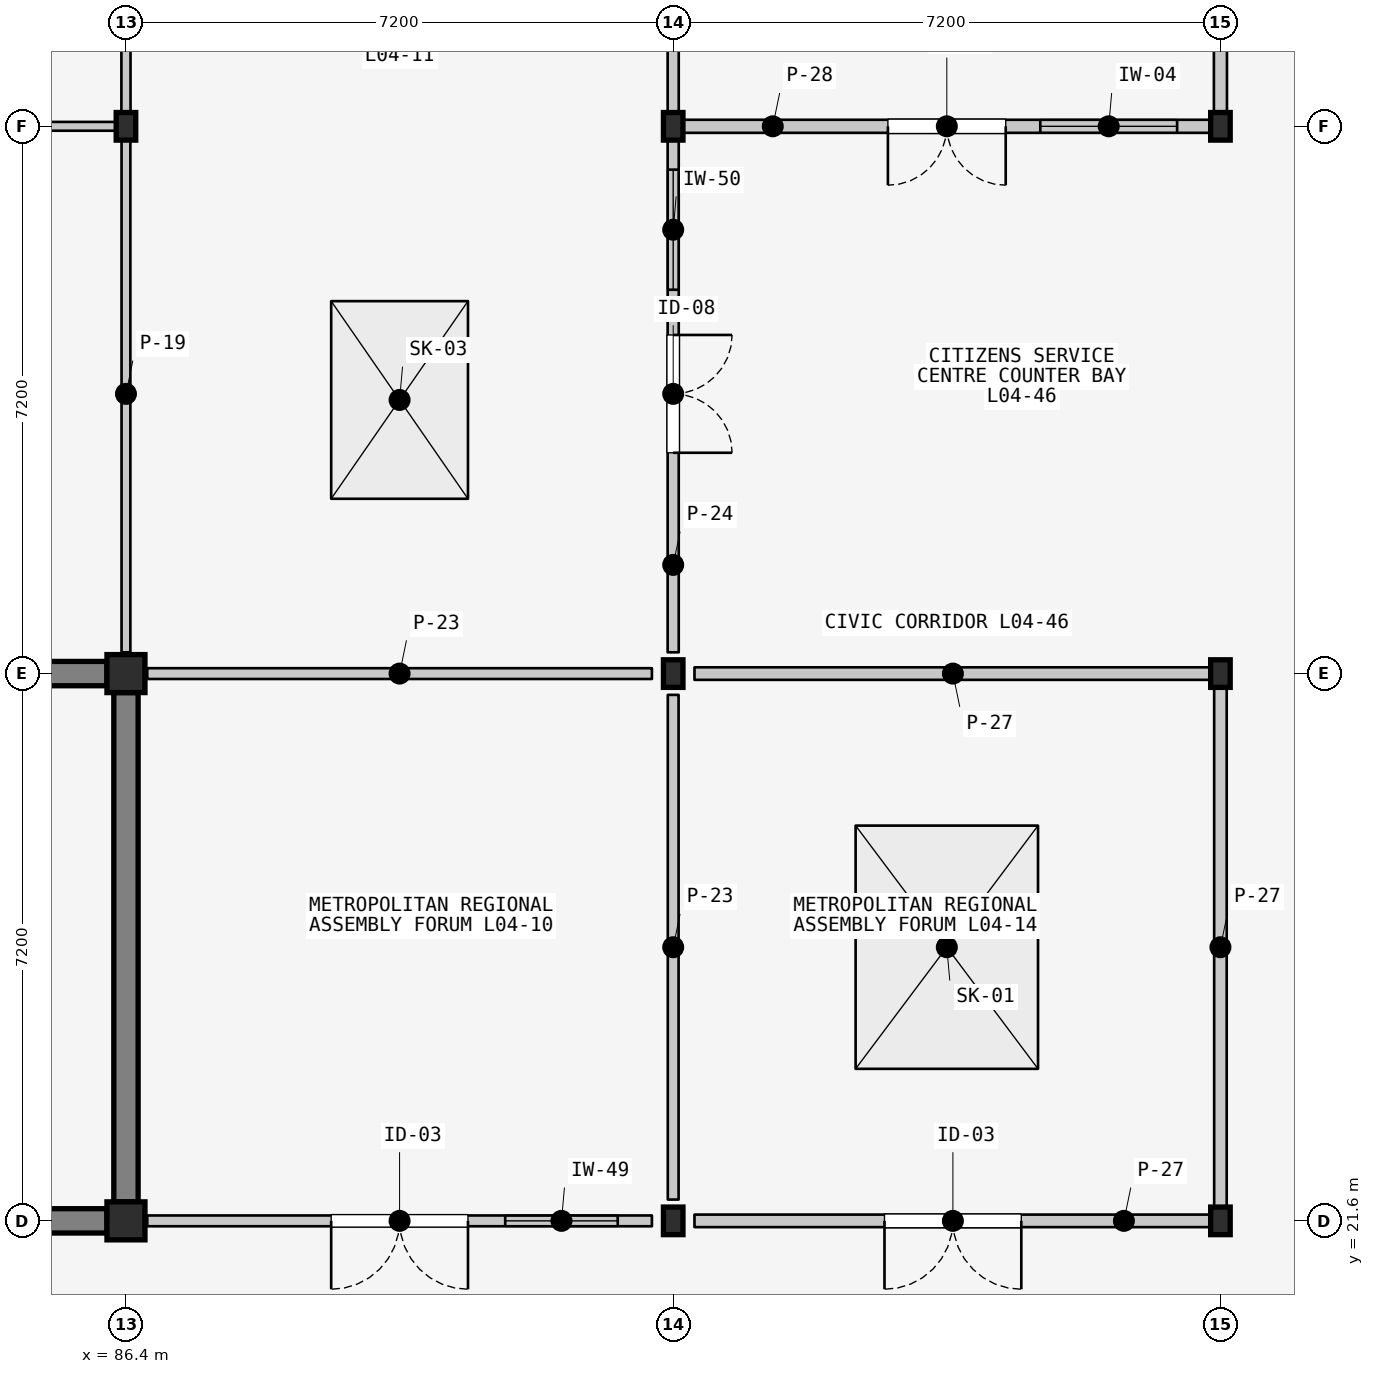
"""IFC4 building model, lengths in metres.
Left out: names, types, materials, properties, quantities, classifications, styles, units other than length and angle.
Written with IfcOpenShell. Run it as: python <this file> out.ifc"""

import sys

from ifc_helpers import new_model, si_unit, direction, frame, frame_2d, origin, origin_2d, place, context, subcontext, project, spatial, rectangle, i_section, extrude, element, fill, save


model = new_model("IFC4")
c1 = context("Model", 3, precision=1e-05, world=origin(), true_north=direction((0.0, 1.0)))
c2 = subcontext(c1, "Body", "Model", "MODEL_VIEW")
j1 = project(units=[si_unit("LENGTHUNIT", "METRE"), si_unit("PLANEANGLEUNIT", "RADIAN")], contexts=[c1])
p1 = place(None, origin())
s1 = spatial("IfcSite", under=j1, at=p1, CompositionType="ELEMENT")
p2 = place(p1, origin())
s2 = spatial("IfcBuilding", under=s1, at=p2, CompositionType="ELEMENT")
p3 = place(p2, frame((0.0, 0.0, 14.1)))
s3 = spatial("IfcBuildingStorey", under=s2, at=p3, CompositionType="ELEMENT", Elevation=14.1)
p4 = place(p3, frame((86.4, 21.6, 0.0), z_axis=(0.0, 0.0, 1.0), x_axis=(1.0, 0.0, 0.0)))
e1 = element("IfcColumn", 1, at=p4, inside=s3, PredefinedType="COLUMN", context=c2, shape_type="SweptSolid", body=[
    extrude(rectangle(XDim=0.5, YDim=0.5, at=origin_2d()), origin(), (0.0, 0.0, 1.0), 7.647),
])
p5 = place(p3, frame((86.4, 28.8, 0.0), z_axis=(0.0, 0.0, 1.0), x_axis=(1.0, 0.0, 0.0)))
e2 = element("IfcColumn", 2, at=p5, inside=s3, PredefinedType="COLUMN", context=c2, shape_type="SweptSolid", body=[
    extrude(rectangle(XDim=0.5, YDim=0.5, at=origin_2d()), origin(), (0.0, 0.0, 1.0), 8.99),
])
p6 = place(p3, frame((86.4, 36.0, 0.0), z_axis=(0.0, 0.0, 1.0), x_axis=(1.0, 0.0, 0.0)))
e3 = element("IfcColumn", 3, at=p6, inside=s3, PredefinedType="COLUMN", context=c2, shape_type="SweptSolid", body=[
    extrude(i_section(OverallWidth=0.257, OverallDepth=0.363, WebThickness=0.013, FlangeThickness=0.022, FilletRadius=0.015, at=origin_2d()), origin(), (0.0, 0.0, 1.0), 10.333),
])
p7 = place(p3, frame((93.6, 21.6, 0.0), z_axis=(0.0, 0.0, 1.0), x_axis=(1.0, 0.0, 0.0)))
e4 = element("IfcColumn", 4, at=p7, inside=s3, PredefinedType="COLUMN", context=c2, shape_type="SweptSolid", body=[
    extrude(i_section(OverallWidth=0.257, OverallDepth=0.363, WebThickness=0.013, FlangeThickness=0.022, FilletRadius=0.015, at=origin_2d()), origin(), (0.0, 0.0, 1.0), 7.676),
])
p8 = place(p3, frame((93.6, 28.8, 0.0), z_axis=(0.0, 0.0, 1.0), x_axis=(1.0, 0.0, 0.0)))
e5 = element("IfcColumn", 5, at=p8, inside=s3, PredefinedType="COLUMN", context=c2, shape_type="SweptSolid", body=[
    extrude(i_section(OverallWidth=0.257, OverallDepth=0.363, WebThickness=0.013, FlangeThickness=0.022, FilletRadius=0.015, at=origin_2d()), origin(), (0.0, 0.0, 1.0), 9.019),
])
p9 = place(p3, frame((93.6, 36.0, 0.0), z_axis=(0.0, 0.0, 1.0), x_axis=(1.0, 0.0, 0.0)))
e6 = element("IfcColumn", 6, at=p9, inside=s3, PredefinedType="COLUMN", context=c2, shape_type="SweptSolid", body=[
    extrude(i_section(OverallWidth=0.257, OverallDepth=0.363, WebThickness=0.013, FlangeThickness=0.022, FilletRadius=0.015, at=origin_2d()), origin(), (0.0, 0.0, 1.0), 10.362),
])
p10 = place(p3, frame((100.8, 21.6, 0.0), z_axis=(0.0, 0.0, 1.0), x_axis=(1.0, 0.0, 0.0)))
e7 = element("IfcColumn", 7, at=p10, inside=s3, PredefinedType="COLUMN", context=c2, shape_type="SweptSolid", body=[
    extrude(i_section(OverallWidth=0.257, OverallDepth=0.363, WebThickness=0.013, FlangeThickness=0.022, FilletRadius=0.015, at=origin_2d()), origin(), (0.0, 0.0, 1.0), 7.705),
])
p11 = place(p3, frame((100.8, 28.8, 0.0), z_axis=(0.0, 0.0, 1.0), x_axis=(1.0, 0.0, 0.0)))
e8 = element("IfcColumn", 8, at=p11, inside=s3, PredefinedType="COLUMN", context=c2, shape_type="SweptSolid", body=[
    extrude(i_section(OverallWidth=0.257, OverallDepth=0.363, WebThickness=0.013, FlangeThickness=0.022, FilletRadius=0.015, at=origin_2d()), origin(), (0.0, 0.0, 1.0), 9.048),
])
p12 = place(p3, frame((100.8, 36.0, 0.0), z_axis=(0.0, 0.0, 1.0), x_axis=(1.0, 0.0, 0.0)))
e9 = element("IfcColumn", 9, at=p12, inside=s3, PredefinedType="COLUMN", context=c2, shape_type="SweptSolid", body=[
    extrude(i_section(OverallWidth=0.257, OverallDepth=0.363, WebThickness=0.013, FlangeThickness=0.022, FilletRadius=0.015, at=origin_2d()), origin(), (0.0, 0.0, 1.0), 10.39),
])
p13 = place(p3, frame((79.45, 21.6, 0.0), z_axis=(0.0, 0.0, 1.0), x_axis=(1.0, 0.0, 0.0)))
e10 = element("IfcWall", 10, at=p13, inside=s3, PredefinedType="SOLIDWALL", context=c2, shape_type="SweptSolid", body=[
    extrude(rectangle(XDim=6.7, YDim=0.32, at=frame_2d((3.35, 0.0))), origin(), (0.0, 0.0, 1.0), 6.892),
])
p14 = place(p3, frame((86.15, 28.8, 0.0), z_axis=(0.0, 0.0, 1.0), x_axis=(-1.0, 0.0, 0.0)))
e11 = element("IfcWall", 11, at=p14, inside=s3, PredefinedType="SOLIDWALL", context=c2, shape_type="SweptSolid", body=[
    extrude(rectangle(XDim=6.7, YDim=0.32, at=frame_2d((3.35, 0.0))), origin(), (0.0, 0.0, 1.0), 8.235),
])
p15 = place(p3, frame((86.4, 21.85, 0.0), z_axis=(0.0, 0.0, 1.0), x_axis=(0.0, 1.0, 0.0)))
e12 = element("IfcWall", 12, at=p15, inside=s3, PredefinedType="SOLIDWALL", context=c2, shape_type="SweptSolid", body=[
    extrude(rectangle(XDim=6.7, YDim=0.32, at=frame_2d((3.35, 0.0))), origin(), (0.0, 0.0, 1.0), 6.965),
])
p16 = place(p3, frame((79.32, 36.0, 0.0), z_axis=(0.0, 0.0, 1.0), x_axis=(1.0, 0.0, 0.0)))
e13 = element("IfcWall", 13, at=p16, inside=s3, PredefinedType="PARTITIONING", context=c2, shape_type="SweptSolid", body=[
    extrude(rectangle(XDim=6.96, YDim=0.116, at=frame_2d((3.48, 0.0))), origin(), (0.0, 0.0, 1.0), 3.72),
])
p17 = place(p3, frame((86.4, 35.88, 0.0), z_axis=(0.0, 0.0, 1.0), x_axis=(0.0, -1.0, 0.0)))
e14 = element("IfcWall", 14, at=p17, inside=s3, PredefinedType="PARTITIONING", context=c2, shape_type="SweptSolid", body=[
    extrude(rectangle(XDim=6.8, YDim=0.116, at=frame_2d((3.4, 0.0))), origin(), (0.0, 0.0, 1.0), 3.72),
])
p18 = place(p3, frame((86.4, 42.92, 0.0), z_axis=(0.0, 0.0, 1.0), x_axis=(0.0, -1.0, 0.0)))
e15 = element("IfcWall", 15, at=p18, inside=s3, PredefinedType="PARTITIONING", context=c2, shape_type="SweptSolid", body=[
    extrude(rectangle(XDim=6.8, YDim=0.12, at=frame_2d((3.4, 0.0))), origin(), (0.0, 0.0, 1.0), 3.72),
])
p19 = place(p3, frame((93.32, 21.6, 0.0), z_axis=(0.0, 0.0, 1.0), x_axis=(-1.0, 0.0, 0.0)))
e16 = element("IfcWall", 16, at=p19, inside=s3, PredefinedType="PARTITIONING", context=c2, shape_type="SweptSolid", body=[
    extrude(rectangle(XDim=6.64, YDim=0.142, at=frame_2d((3.32, 0.0))), origin(), (0.0, 0.0, 1.0), 3.72),
])
p20 = place(p19, frame((2.42, 0.0, 0.0)))
e17 = element("IfcOpeningElement", 17, at=p20, cuts=e16, PredefinedType="OPENING", context=c2, shape_type="SweptSolid", body=[
    extrude(rectangle(XDim=1.8, YDim=2.4, at=frame_2d((0.9, 1.2))), frame((0.0, 0.081, 0.0), z_axis=(0.0, -1.0, 0.0), x_axis=(1.0, 0.0, 0.0)), (0.0, 0.0, 1.0), 0.162),
])
p21 = place(p19, frame((0.45, 0.0, 1.05)))
e18 = element("IfcOpeningElement", 18, at=p21, cuts=e16, PredefinedType="OPENING", context=c2, shape_type="SweptSolid", body=[
    extrude(rectangle(XDim=1.48, YDim=1.48, at=frame_2d((0.74, 0.74))), frame((0.0, 0.081, 0.0), z_axis=(0.0, -1.0, 0.0), x_axis=(1.0, 0.0, 0.0)), (0.0, 0.0, 1.0), 0.162),
])
for number, where, z_axis, x_axis in (
    (19, (86.68, 28.8, 0.0), (0.0, 0.0, 1.0), (1.0, 0.0, 0.0)),
    (20, (93.6, 28.52, 0.0), (0.0, 0.0, 1.0), (0.0, -1.0, 0.0)),
):
    element("IfcWall", number, at=place(p3, frame(where, z_axis=z_axis, x_axis=x_axis)), inside=s3, PredefinedType="PARTITIONING", context=c2, shape_type="SweptSolid", body=[
        extrude(rectangle(XDim=6.64, YDim=0.142, at=frame_2d((3.32, 0.0))), origin(), (0.0, 0.0, 1.0), 3.72),
    ])
p22 = place(p3, frame((93.6, 35.88, 0.0), z_axis=(0.0, 0.0, 1.0), x_axis=(0.0, -1.0, 0.0)))
e21 = element("IfcWall", 21, at=p22, inside=s3, PredefinedType="PARTITIONING", context=c2, shape_type="SweptSolid", body=[
    extrude(rectangle(XDim=6.8, YDim=0.146, at=frame_2d((3.4, 0.0))), origin(), (0.0, 0.0, 1.0), 3.72),
])
p23 = place(p22, frame((2.625, 0.0, 0.0)))
e22 = element("IfcOpeningElement", 22, at=p23, cuts=e21, PredefinedType="OPENING", context=c2, shape_type="SweptSolid", body=[
    extrude(rectangle(XDim=1.55, YDim=2.3, at=frame_2d((0.775, 1.15))), frame((0.0, 0.083, 0.0), z_axis=(0.0, -1.0, 0.0), x_axis=(1.0, 0.0, 0.0)), (0.0, 0.0, 1.0), 0.166),
])
p24 = place(p22, frame((0.45, 0.0, 1.05)))
e23 = element("IfcOpeningElement", 23, at=p24, cuts=e21, PredefinedType="OPENING", context=c2, shape_type="SweptSolid", body=[
    extrude(rectangle(XDim=1.58, YDim=1.48, at=frame_2d((0.79, 0.74))), frame((0.0, 0.083, 0.0), z_axis=(0.0, -1.0, 0.0), x_axis=(1.0, 0.0, 0.0)), (0.0, 0.0, 1.0), 0.166),
])
p25 = place(p3, frame((93.6, 42.92, 0.0), z_axis=(0.0, 0.0, 1.0), x_axis=(0.0, -1.0, 0.0)))
e24 = element("IfcWall", 24, at=p25, inside=s3, PredefinedType="PARTITIONING", context=c2, shape_type="SweptSolid", body=[
    extrude(rectangle(XDim=6.8, YDim=0.146, at=frame_2d((3.4, 0.0))), origin(), (0.0, 0.0, 1.0), 3.72),
])
p26 = place(p3, frame((100.68, 21.6, 0.0), z_axis=(0.0, 0.0, 1.0), x_axis=(-1.0, 0.0, 0.0)))
e25 = element("IfcWall", 25, at=p26, inside=s3, PredefinedType="PARTITIONING", context=c2, shape_type="SweptSolid", body=[
    extrude(rectangle(XDim=6.8, YDim=0.165, at=frame_2d((3.4, 0.0))), origin(), (0.0, 0.0, 1.0), 3.72),
])
p27 = place(p26, frame((2.5, 0.0, 0.0)))
e26 = element("IfcOpeningElement", 26, at=p27, cuts=e25, PredefinedType="OPENING", context=c2, shape_type="SweptSolid", body=[
    extrude(rectangle(XDim=1.8, YDim=2.4, at=frame_2d((0.9, 1.2))), frame((0.0, 0.093, 0.0), z_axis=(0.0, -1.0, 0.0), x_axis=(1.0, 0.0, 0.0)), (0.0, 0.0, 1.0), 0.185),
])
p28 = place(p3, frame((93.88, 28.8, 0.0), z_axis=(0.0, 0.0, 1.0), x_axis=(1.0, 0.0, 0.0)))
e27 = element("IfcWall", 27, at=p28, inside=s3, PredefinedType="PARTITIONING", context=c2, shape_type="SweptSolid", body=[
    extrude(rectangle(XDim=6.8, YDim=0.165, at=frame_2d((3.4, 0.0))), origin(), (0.0, 0.0, 1.0), 3.72),
])
p29 = place(p3, frame((100.8, 28.68, 0.0), z_axis=(0.0, 0.0, 1.0), x_axis=(0.0, -1.0, 0.0)))
e28 = element("IfcWall", 28, at=p29, inside=s3, PredefinedType="PARTITIONING", context=c2, shape_type="SweptSolid", body=[
    extrude(rectangle(XDim=6.96, YDim=0.165, at=frame_2d((3.48, 0.0))), origin(), (0.0, 0.0, 1.0), 3.72),
])
p30 = place(p3, frame((100.68, 36.0, 0.0), z_axis=(0.0, 0.0, 1.0), x_axis=(-1.0, 0.0, 0.0)))
e29 = element("IfcWall", 29, at=p30, inside=s3, PredefinedType="PARTITIONING", context=c2, shape_type="SweptSolid", body=[
    extrude(rectangle(XDim=6.96, YDim=0.172, at=frame_2d((3.48, 0.0))), origin(), (0.0, 0.0, 1.0), 3.72),
])
p31 = place(p30, frame((2.705, 0.0, 0.0)))
e30 = element("IfcOpeningElement", 30, at=p31, cuts=e29, PredefinedType="OPENING", context=c2, shape_type="SweptSolid", body=[
    extrude(rectangle(XDim=1.55, YDim=2.3, at=frame_2d((0.775, 1.15))), frame((0.0, 0.096, 0.0), z_axis=(0.0, -1.0, 0.0), x_axis=(1.0, 0.0, 0.0)), (0.0, 0.0, 1.0), 0.192),
])
p32 = place(p30, frame((0.45, 0.0, 1.05)))
e31 = element("IfcOpeningElement", 31, at=p32, cuts=e29, PredefinedType="OPENING", context=c2, shape_type="SweptSolid", body=[
    extrude(rectangle(XDim=1.8, YDim=1.4, at=frame_2d((0.9, 0.7))), frame((0.0, 0.096, 0.0), z_axis=(0.0, -1.0, 0.0), x_axis=(1.0, 0.0, 0.0)), (0.0, 0.0, 1.0), 0.192),
])
p33 = place(p3, frame((100.8, 43.08, 0.0), z_axis=(0.0, 0.0, 1.0), x_axis=(0.0, -1.0, 0.0)))
e32 = element("IfcWall", 32, at=p33, inside=s3, PredefinedType="PARTITIONING", context=c2, shape_type="SweptSolid", body=[
    extrude(rectangle(XDim=6.96, YDim=0.172, at=frame_2d((3.48, 0.0))), origin(), (0.0, 0.0, 1.0), 3.72),
])
p34 = place(p3, frame((64.8, 7.2, 5.1), z_axis=(-0.003900009496, -0.183347177316, 0.983040488737), x_axis=(0.999992130387, 0.0, 0.003967261622)))
p35 = place(p34, frame((25.219, 25.635, 0.0)))
p36 = place(p35, origin())
e33 = element("IfcWindow", 33, at=p36, inside=s3, PartitioningType="SINGLE_PANEL", PredefinedType="SKYLIGHT", context=c2, shape_type="SweptSolid", body=[
    extrude(rectangle(XDim=1.8, YDim=2.6, at=origin_2d()), origin(), (0.0, 0.0, -1.0), 0.06),
])
p37 = place(p34, frame((32.414, 18.31, 0.0)))
p38 = place(p37, origin())
e34 = element("IfcWindow", 34, at=p38, inside=s3, PartitioningType="SINGLE_PANEL", PredefinedType="SKYLIGHT", context=c2, shape_type="SweptSolid", body=[
    extrude(rectangle(XDim=2.4, YDim=3.2, at=origin_2d()), origin(), (0.0, 0.0, -1.0), 0.06),
])
p39 = place(p20, origin())
e35 = element("IfcDoor", 35, at=p39, inside=s3, OperationType="DOUBLE_DOOR_SINGLE_SWING", PredefinedType="DOOR", context=c2, shape_type="SweptSolid", body=[
    extrude(rectangle(XDim=1.8, YDim=2.4, at=frame_2d((0.9, 1.2))), frame((0.0, 0.025, 0.0), z_axis=(0.0, -1.0, 0.0), x_axis=(1.0, 0.0, 0.0)), (0.0, 0.0, 1.0), 0.05),
])
fill(e17, e35)
p40 = place(p21, origin())
e36 = element("IfcWindow", 36, at=p40, inside=s3, PartitioningType="SINGLE_PANEL", PredefinedType="WINDOW", context=c2, shape_type="SweptSolid", body=[
    extrude(rectangle(XDim=1.48, YDim=1.48, at=frame_2d((0.74, 0.74))), frame((0.0, 0.03, 0.0), z_axis=(0.0, -1.0, 0.0), x_axis=(1.0, 0.0, 0.0)), (0.0, 0.0, 1.0), 0.06),
])
fill(e18, e36)
p41 = place(p23, origin())
e37 = element("IfcDoor", 37, at=p41, inside=s3, OperationType="DOUBLE_DOOR_SINGLE_SWING", PredefinedType="DOOR", context=c2, shape_type="SweptSolid", body=[
    extrude(rectangle(XDim=1.55, YDim=2.3, at=frame_2d((0.775, 1.15))), frame((0.0, 0.025, 0.0), z_axis=(0.0, -1.0, 0.0), x_axis=(1.0, 0.0, 0.0)), (0.0, 0.0, 1.0), 0.05),
])
fill(e22, e37)
p42 = place(p24, origin())
e38 = element("IfcWindow", 38, at=p42, inside=s3, PartitioningType="SINGLE_PANEL", PredefinedType="WINDOW", context=c2, shape_type="SweptSolid", body=[
    extrude(rectangle(XDim=1.58, YDim=1.48, at=frame_2d((0.79, 0.74))), frame((0.0, 0.03, 0.0), z_axis=(0.0, -1.0, 0.0), x_axis=(1.0, 0.0, 0.0)), (0.0, 0.0, 1.0), 0.06),
])
fill(e23, e38)
p43 = place(p27, origin())
e39 = element("IfcDoor", 39, at=p43, inside=s3, OperationType="DOUBLE_DOOR_SINGLE_SWING", PredefinedType="DOOR", context=c2, shape_type="SweptSolid", body=[
    extrude(rectangle(XDim=1.8, YDim=2.4, at=frame_2d((0.9, 1.2))), frame((0.0, 0.025, 0.0), z_axis=(0.0, -1.0, 0.0), x_axis=(1.0, 0.0, 0.0)), (0.0, 0.0, 1.0), 0.05),
])
fill(e26, e39)
p44 = place(p31, origin())
e40 = element("IfcDoor", 40, at=p44, inside=s3, OperationType="DOUBLE_DOOR_SINGLE_SWING", PredefinedType="DOOR", context=c2, shape_type="SweptSolid", body=[
    extrude(rectangle(XDim=1.55, YDim=2.3, at=frame_2d((0.775, 1.15))), frame((0.0, 0.025, 0.0), z_axis=(0.0, -1.0, 0.0), x_axis=(1.0, 0.0, 0.0)), (0.0, 0.0, 1.0), 0.05),
])
fill(e30, e40)
p45 = place(p32, origin())
e41 = element("IfcWindow", 41, at=p45, inside=s3, PartitioningType="SINGLE_PANEL", PredefinedType="WINDOW", context=c2, shape_type="SweptSolid", body=[
    extrude(rectangle(XDim=1.8, YDim=1.4, at=frame_2d((0.9, 0.7))), frame((0.0, 0.03, 0.0), z_axis=(0.0, -1.0, 0.0), x_axis=(1.0, 0.0, 0.0)), (0.0, 0.0, 1.0), 0.06),
])
fill(e31, e41)
save(model, sys.argv[1])
